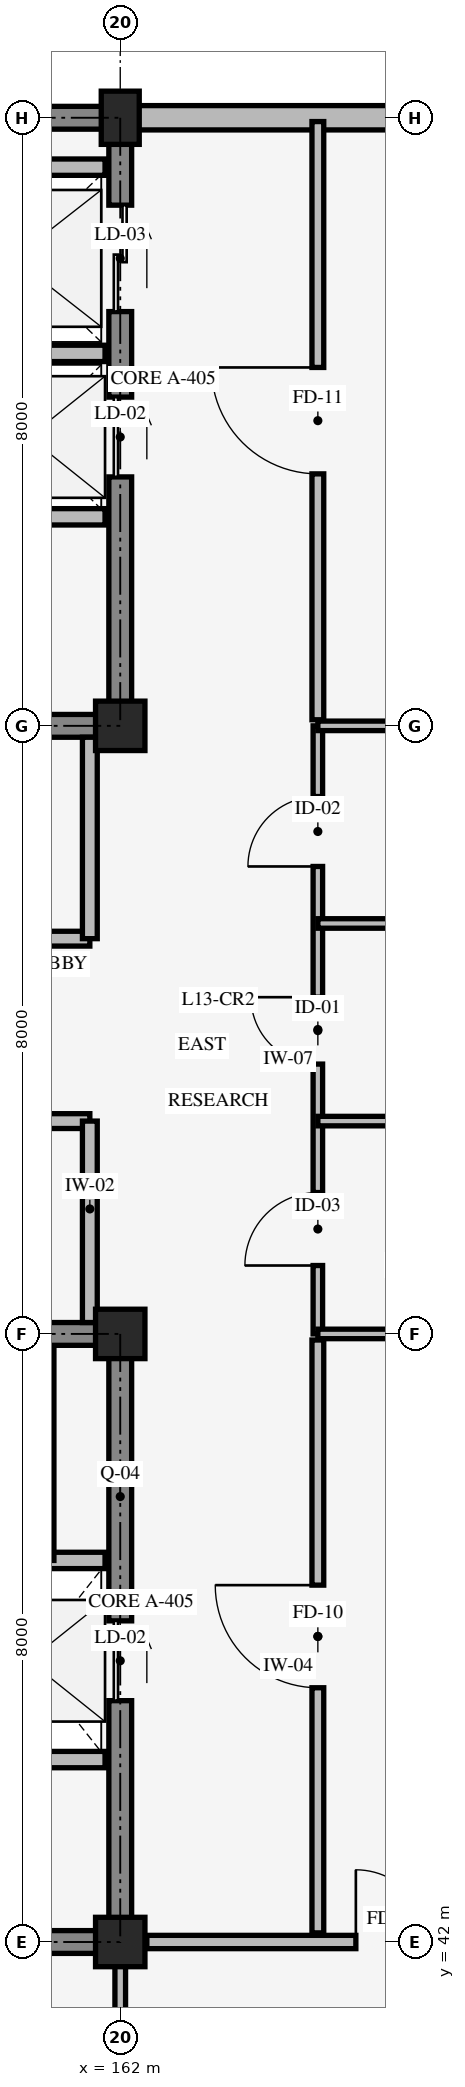
"""IFC4 building model, lengths in metres.
Left out: names, types, materials, properties, quantities, classifications, styles, units other than length and angle.
Written with IfcOpenShell. Run it as: python <this file> out.ifc"""

import sys

from ifc_helpers import new_model, si_unit, direction, frame, frame_2d, origin, origin_2d, place, context, subcontext, project, spatial, rectangle, extrude, element, fill, save


model = new_model("IFC4")
c1 = context("Model", 3, precision=1e-05, world=origin(), true_north=direction((0.0, 1.0)))
c2 = subcontext(c1, "Body", "Model", "MODEL_VIEW")
j1 = project(units=[si_unit("LENGTHUNIT", "METRE"), si_unit("PLANEANGLEUNIT", "RADIAN")], contexts=[c1])
p1 = place(None, origin())
s1 = spatial("IfcSite", under=j1, at=p1, CompositionType="ELEMENT")
p2 = place(p1, origin())
s2 = spatial("IfcBuilding", under=s1, at=p2, CompositionType="ELEMENT")
p3 = place(p2, frame((0.0, 0.0, 52.8)))
s3 = spatial("IfcBuildingStorey", under=s2, at=p3, CompositionType="ELEMENT", Elevation=52.8)
p4 = place(p3, frame((154.0, 42.0, 0.0), z_axis=(0.0, 0.0, 1.0), x_axis=(1.0, 0.0, 0.0)))
e1 = element("IfcWall", 1, at=p4, inside=s3, PredefinedType="SHEAR", context=c2, shape_type="SweptSolid", body=[
    extrude(rectangle(XDim=8.0, YDim=0.3, at=frame_2d((4.0, 0.0))), origin(), (0.0, 0.0, 1.0), 3.95),
])
p5 = place(p3, frame((162.0, 42.0, 0.0), z_axis=(0.0, 0.0, 1.0), x_axis=(0.0, 1.0, 0.0)))
e2 = element("IfcWall", 2, at=p5, inside=s3, PredefinedType="SHEAR", context=c2, shape_type="SweptSolid", body=[
    extrude(rectangle(XDim=8.0, YDim=0.3, at=frame_2d((4.0, 0.0))), origin(), (0.0, 0.0, 1.0), 3.95),
])
p6 = place(p5, frame((3.175, 0.0, 0.0)))
e3 = element("IfcOpeningElement", 3, at=p6, cuts=e2, PredefinedType="OPENING", context=c2, shape_type="SweptSolid", body=[
    extrude(rectangle(XDim=1.05, YDim=2.2, at=frame_2d((0.525, 1.1))), frame((0.0, 0.16, 0.0), z_axis=(0.0, -1.0, 0.0), x_axis=(1.0, 0.0, 0.0)), (0.0, 0.0, 1.0), 0.32),
])
p7 = place(p3, frame((162.0, 50.0, 0.0), z_axis=(0.0, 0.0, 1.0), x_axis=(-1.0, 0.0, 0.0)))
e4 = element("IfcWall", 4, at=p7, inside=s3, PredefinedType="SHEAR", context=c2, shape_type="SweptSolid", body=[
    extrude(rectangle(XDim=8.0, YDim=0.3, at=frame_2d((4.0, 0.0))), origin(), (0.0, 0.0, 1.0), 3.95),
])
p8 = place(p7, frame((5.3, 0.0, 0.0)))
e5 = element("IfcOpeningElement", 5, at=p8, cuts=e4, PredefinedType="OPENING", context=c2, shape_type="SweptSolid", body=[
    extrude(rectangle(XDim=1.3, YDim=2.15, at=frame_2d((0.65, 1.075))), frame((0.0, 0.16, 0.0), z_axis=(0.0, -1.0, 0.0), x_axis=(1.0, 0.0, 0.0)), (0.0, 0.0, 1.0), 0.32),
])
p9 = place(p7, frame((1.45, 0.0, 0.0)))
e6 = element("IfcOpeningElement", 6, at=p9, cuts=e4, PredefinedType="OPENING", context=c2, shape_type="SweptSolid", body=[
    extrude(rectangle(XDim=1.1, YDim=2.2, at=frame_2d((0.55, 1.1))), frame((0.0, 0.16, 0.0), z_axis=(0.0, -1.0, 0.0), x_axis=(1.0, 0.0, 0.0)), (0.0, 0.0, 1.0), 0.32),
])
p10 = place(p3, frame((154.0, 58.0, 0.0), z_axis=(0.0, 0.0, 1.0), x_axis=(1.0, 0.0, 0.0)))
e7 = element("IfcWall", 7, at=p10, inside=s3, PredefinedType="SHEAR", context=c2, shape_type="SweptSolid", body=[
    extrude(rectangle(XDim=8.0, YDim=0.3, at=frame_2d((4.0, 0.0))), origin(), (0.0, 0.0, 1.0), 3.95),
])
p11 = place(p10, frame((1.4, 0.0, 0.0)))
e8 = element("IfcOpeningElement", 8, at=p11, cuts=e7, PredefinedType="OPENING", context=c2, shape_type="SweptSolid", body=[
    extrude(rectangle(XDim=1.3, YDim=2.15, at=frame_2d((0.65, 1.075))), frame((0.0, 0.16, 0.0), z_axis=(0.0, -1.0, 0.0), x_axis=(1.0, 0.0, 0.0)), (0.0, 0.0, 1.0), 0.32),
])
p12 = place(p10, frame((5.3, 0.0, 0.0)))
e9 = element("IfcOpeningElement", 9, at=p12, cuts=e7, PredefinedType="OPENING", context=c2, shape_type="SweptSolid", body=[
    extrude(rectangle(XDim=1.1, YDim=2.2, at=frame_2d((0.55, 1.1))), frame((0.0, 0.16, 0.0), z_axis=(0.0, -1.0, 0.0), x_axis=(1.0, 0.0, 0.0)), (0.0, 0.0, 1.0), 0.32),
])
p13 = place(p3, frame((162.0, 58.0, 0.0), z_axis=(0.0, 0.0, 1.0), x_axis=(0.0, 1.0, 0.0)))
e10 = element("IfcWall", 10, at=p13, inside=s3, PredefinedType="SHEAR", context=c2, shape_type="SweptSolid", body=[
    extrude(rectangle(XDim=8.0, YDim=0.3, at=frame_2d((4.0, 0.0))), origin(), (0.0, 0.0, 1.0), 3.95),
])
p14 = place(p13, frame((3.275, 0.0, 0.0)))
e11 = element("IfcOpeningElement", 11, at=p14, cuts=e10, PredefinedType="OPENING", context=c2, shape_type="SweptSolid", body=[
    extrude(rectangle(XDim=1.05, YDim=2.2, at=frame_2d((0.525, 1.1))), frame((0.0, 0.16, 0.0), z_axis=(0.0, -1.0, 0.0), x_axis=(1.0, 0.0, 0.0)), (0.0, 0.0, 1.0), 0.32),
])
p15 = place(p13, frame((5.45, 0.0, 0.0)))
e12 = element("IfcOpeningElement", 12, at=p15, cuts=e10, PredefinedType="OPENING", context=c2, shape_type="SweptSolid", body=[
    extrude(rectangle(XDim=1.4, YDim=2.3, at=frame_2d((0.7, 1.15))), frame((0.0, 0.16, 0.0), z_axis=(0.0, -1.0, 0.0), x_axis=(1.0, 0.0, 0.0)), (0.0, 0.0, 1.0), 0.32),
])
p16 = place(p3, frame((162.0, 66.0, 0.0), z_axis=(0.0, 0.0, 1.0), x_axis=(-1.0, 0.0, 0.0)))
e13 = element("IfcWall", 13, at=p16, inside=s3, PredefinedType="SHEAR", context=c2, shape_type="SweptSolid", body=[
    extrude(rectangle(XDim=8.0, YDim=0.3, at=frame_2d((4.0, 0.0))), origin(), (0.0, 0.0, 1.0), 3.95),
])
for number, where, z_axis, x_axis in (
    (14, (162.0, 42.0, 0.0), (0.0, 0.0, 1.0), (1.0, 0.0, 0.0)),
    (15, (162.0, 50.0, 0.0), (0.0, 0.0, 1.0), (1.0, 0.0, 0.0)),
    (16, (162.0, 58.0, 0.0), (0.0, 0.0, 1.0), (1.0, 0.0, 0.0)),
):
    element("IfcColumn", number, at=place(p3, frame(where, z_axis=z_axis, x_axis=x_axis)), inside=s3, PredefinedType="COLUMN", context=c2, shape_type="SweptSolid", body=[
        extrude(rectangle(XDim=0.65, YDim=0.65, at=origin_2d()), origin(), (0.0, 0.0, 1.0), 4.2),
    ])
p17 = place(p3, frame((162.0, 66.0, 0.0), z_axis=(0.0, 0.0, 1.0), x_axis=(1.0, 0.0, 0.0)))
e17 = element("IfcColumn", 17, at=p17, inside=s3, PredefinedType="COLUMN", context=c2, shape_type="SweptSolid", body=[
    extrude(rectangle(XDim=0.5, YDim=0.7, at=origin_2d()), origin(), (0.0, 0.0, 1.0), 4.2),
])
p18 = place(p3, frame((162.0, 66.0, 0.0), z_axis=(0.0, 0.0, 1.0), x_axis=(1.0, 0.0, 0.0)))
e18 = element("IfcWall", 18, at=p18, inside=s3, PredefinedType="STANDARD", context=c2, shape_type="SweptSolid", body=[
    extrude(rectangle(XDim=8.0, YDim=0.32, at=frame_2d((4.0, 0.0))), origin(), (0.0, 0.0, 1.0), 3.29),
])
p19 = place(p18, frame((4.317, 0.0, 0.85)))
e19 = element("IfcOpeningElement", 19, at=p19, cuts=e18, PredefinedType="OPENING", context=c2, shape_type="SweptSolid", body=[
    extrude(rectangle(XDim=2.3, YDim=1.5, at=frame_2d((1.15, 0.75))), frame((0.0, 0.17, 0.0), z_axis=(0.0, -1.0, 0.0), x_axis=(1.0, 0.0, 0.0)), (0.0, 0.0, 1.0), 0.34),
])
p20 = place(p3, frame((158.45, 47.02, 0.0), z_axis=(0.0, 0.0, 1.0), x_axis=(1.0, 0.0, 0.0)))
e20 = element("IfcWall", 20, at=p20, inside=s3, PredefinedType="STANDARD", context=c2, shape_type="SweptSolid", body=[
    extrude(rectangle(XDim=3.35, YDim=0.215, at=frame_2d((1.675, 0.0))), origin(), (0.0, 0.0, 1.0), 3.9),
])
p21 = place(p3, frame((161.02, 47.02, 0.0), z_axis=(0.0, 0.0, 1.0), x_axis=(0.0, 1.0, 0.0)))
e21 = element("IfcWall", 21, at=p21, inside=s3, PredefinedType="STANDARD", context=c2, shape_type="SweptSolid", body=[
    extrude(rectangle(XDim=2.78, YDim=0.215, at=frame_2d((1.39, 0.0))), origin(), (0.0, 0.0, 1.0), 3.9),
])
p22 = place(p3, frame((159.78, 44.4, 0.0), z_axis=(0.0, 0.0, 1.0), x_axis=(1.0, 0.0, 0.0)))
e22 = element("IfcWall", 22, at=p22, inside=s3, PredefinedType="STANDARD", context=c2, shape_type="SweptSolid", body=[
    extrude(rectangle(XDim=2.02, YDim=0.215, at=frame_2d((1.01, 0.0))), origin(), (0.0, 0.0, 1.0), 3.9),
])
p23 = place(p3, frame((158.45, 62.9, 0.0), z_axis=(0.0, 0.0, 1.0), x_axis=(1.0, 0.0, 0.0)))
e23 = element("IfcWall", 23, at=p23, inside=s3, PredefinedType="STANDARD", context=c2, shape_type="SweptSolid", body=[
    extrude(rectangle(XDim=3.35, YDim=0.215, at=frame_2d((1.675, 0.0))), origin(), (0.0, 0.0, 1.0), 3.9),
])
p24 = place(p3, frame((159.38, 65.35, 0.0), z_axis=(0.0, 0.0, 1.0), x_axis=(1.0, 0.0, 0.0)))
e24 = element("IfcWall", 24, at=p24, inside=s3, PredefinedType="STANDARD", context=c2, shape_type="SweptSolid", body=[
    extrude(rectangle(XDim=2.42, YDim=0.215, at=frame_2d((1.21, 0.0))), origin(), (0.0, 0.0, 1.0), 3.9),
])
p25 = place(p3, frame((158.45, 60.75, 0.0), z_axis=(0.0, 0.0, 1.0), x_axis=(1.0, 0.0, 0.0)))
e25 = element("IfcWall", 25, at=p25, inside=s3, PredefinedType="STANDARD", context=c2, shape_type="SweptSolid", body=[
    extrude(rectangle(XDim=3.35, YDim=0.215, at=frame_2d((1.675, 0.0))), origin(), (0.0, 0.0, 1.0), 3.9),
])
p26 = place(p3, frame((154.0, 52.8, 0.0), z_axis=(0.0, 0.0, 1.0), x_axis=(1.0, 0.0, 0.0)))
e26 = element("IfcWall", 26, at=p26, inside=s3, PredefinedType="STANDARD", context=c2, shape_type="SweptSolid", body=[
    extrude(rectangle(XDim=7.6, YDim=0.195, at=frame_2d((3.8, 0.0))), origin(), (0.0, 0.0, 1.0), 3.9),
])
p27 = place(p26, frame((2.8, 0.0, 0.0)))
e27 = element("IfcOpeningElement", 27, at=p27, cuts=e26, PredefinedType="OPENING", context=c2, shape_type="SweptSolid", body=[
    extrude(rectangle(XDim=1.25, YDim=2.15, at=frame_2d((0.625, 1.075))), frame((0.0, 0.107, 0.0), z_axis=(0.0, -1.0, 0.0), x_axis=(1.0, 0.0, 0.0)), (0.0, 0.0, 1.0), 0.215),
])
p28 = place(p3, frame((161.6, 50.15, 0.0), z_axis=(0.0, 0.0, 1.0), x_axis=(0.0, 1.0, 0.0)))
e28 = element("IfcWall", 28, at=p28, inside=s3, PredefinedType="STANDARD", context=c2, shape_type="SweptSolid", body=[
    extrude(rectangle(XDim=2.65, YDim=0.195, at=frame_2d((1.325, 0.0))), origin(), (0.0, 0.0, 1.0), 3.34),
])
p29 = place(p3, frame((154.0, 55.2, 0.0), z_axis=(0.0, 0.0, 1.0), x_axis=(1.0, 0.0, 0.0)))
e29 = element("IfcWall", 29, at=p29, inside=s3, PredefinedType="STANDARD", context=c2, shape_type="SweptSolid", body=[
    extrude(rectangle(XDim=7.6, YDim=0.195, at=frame_2d((3.8, 0.0))), origin(), (0.0, 0.0, 1.0), 3.9),
])
p30 = place(p29, frame((2.8, 0.0, 0.0)))
e30 = element("IfcOpeningElement", 30, at=p30, cuts=e29, PredefinedType="OPENING", context=c2, shape_type="SweptSolid", body=[
    extrude(rectangle(XDim=1.35, YDim=2.15, at=frame_2d((0.675, 1.075))), frame((0.0, 0.107, 0.0), z_axis=(0.0, -1.0, 0.0), x_axis=(1.0, 0.0, 0.0)), (0.0, 0.0, 1.0), 0.215),
])
p31 = place(p3, frame((161.6, 55.2, 0.0), z_axis=(0.0, 0.0, 1.0), x_axis=(0.0, 1.0, 0.0)))
e31 = element("IfcWall", 31, at=p31, inside=s3, PredefinedType="STANDARD", context=c2, shape_type="SweptSolid", body=[
    extrude(rectangle(XDim=2.65, YDim=0.195, at=frame_2d((1.325, 0.0))), origin(), (0.0, 0.0, 1.0), 3.34),
])
p32 = place(p3, frame((164.6, 50.0, 0.0), z_axis=(0.0, 0.0, 1.0), x_axis=(0.0, 1.0, 0.0)))
e32 = element("IfcWall", 32, at=p32, inside=s3, PredefinedType="STANDARD", context=c2, shape_type="SweptSolid", body=[
    extrude(rectangle(XDim=8.0, YDim=0.125, at=frame_2d((4.0, 0.0))), origin(), (0.0, 0.0, 1.0), 3.9),
])
p33 = place(p32, frame((0.9, 0.0, 0.0)))
e33 = element("IfcOpeningElement", 33, at=p33, cuts=e32, PredefinedType="OPENING", context=c2, shape_type="SweptSolid", body=[
    extrude(rectangle(XDim=0.96, YDim=2.08, at=frame_2d((0.48, 1.04))), frame((0.0, 0.073, 0.0), z_axis=(0.0, -1.0, 0.0), x_axis=(1.0, 0.0, 0.0)), (0.0, 0.0, 1.0), 0.145),
])
p34 = place(p32, frame((3.55, 0.0, 0.0)))
e34 = element("IfcOpeningElement", 34, at=p34, cuts=e32, PredefinedType="OPENING", context=c2, shape_type="SweptSolid", body=[
    extrude(rectangle(XDim=0.88, YDim=2.05, at=frame_2d((0.44, 1.025))), frame((0.0, 0.073, 0.0), z_axis=(0.0, -1.0, 0.0), x_axis=(1.0, 0.0, 0.0)), (0.0, 0.0, 1.0), 0.145),
])
p35 = place(p32, frame((6.15, 0.0, 0.0)))
e35 = element("IfcOpeningElement", 35, at=p35, cuts=e32, PredefinedType="OPENING", context=c2, shape_type="SweptSolid", body=[
    extrude(rectangle(XDim=0.92, YDim=2.05, at=frame_2d((0.46, 1.025))), frame((0.0, 0.073, 0.0), z_axis=(0.0, -1.0, 0.0), x_axis=(1.0, 0.0, 0.0)), (0.0, 0.0, 1.0), 0.145),
])
p36 = place(p3, frame((164.6, 50.0, 0.0), z_axis=(0.0, 0.0, 1.0), x_axis=(1.0, 0.0, 0.0)))
e36 = element("IfcWall", 36, at=p36, inside=s3, PredefinedType="STANDARD", context=c2, shape_type="SweptSolid", body=[
    extrude(rectangle(XDim=3.8, YDim=0.125, at=frame_2d((1.9, 0.0))), origin(), (0.0, 0.0, 1.0), 3.29),
])
for number, where, z_axis, x_axis in (
    (37, (164.6, 52.8, 0.0), (0.0, 0.0, 1.0), (1.0, 0.0, 0.0)),
    (38, (164.6, 55.4, 0.0), (0.0, 0.0, 1.0), (1.0, 0.0, 0.0)),
):
    element("IfcWall", number, at=place(p3, frame(where, z_axis=z_axis, x_axis=x_axis)), inside=s3, PredefinedType="STANDARD", context=c2, shape_type="SweptSolid", body=[
        extrude(rectangle(XDim=3.8, YDim=0.125, at=frame_2d((1.9, 0.0))), origin(), (0.0, 0.0, 1.0), 3.9),
    ])
p37 = place(p3, frame((164.6, 58.0, 0.0), z_axis=(0.0, 0.0, 1.0), x_axis=(1.0, 0.0, 0.0)))
e39 = element("IfcWall", 39, at=p37, inside=s3, PredefinedType="STANDARD", context=c2, shape_type="SweptSolid", body=[
    extrude(rectangle(XDim=3.8, YDim=0.125, at=frame_2d((1.9, 0.0))), origin(), (0.0, 0.0, 1.0), 3.29),
])
p38 = place(p3, frame((164.6, 42.12, 0.0), z_axis=(0.0, 0.0, 1.0), x_axis=(0.0, 1.0, 0.0)))
e40 = element("IfcWall", 40, at=p38, inside=s3, PredefinedType="STANDARD", context=c2, shape_type="SweptSolid", body=[
    extrude(rectangle(XDim=7.8, YDim=0.155, at=frame_2d((3.9, 0.0))), origin(), (0.0, 0.0, 1.0), 3.9),
])
p39 = place(p38, frame((3.225, 0.0, 0.0)))
e41 = element("IfcOpeningElement", 41, at=p39, cuts=e40, PredefinedType="OPENING", context=c2, shape_type="SweptSolid", body=[
    extrude(rectangle(XDim=1.35, YDim=2.15, at=frame_2d((0.675, 1.075))), frame((0.0, 0.087, 0.0), z_axis=(0.0, -1.0, 0.0), x_axis=(1.0, 0.0, 0.0)), (0.0, 0.0, 1.0), 0.175),
])
p40 = place(p3, frame((164.6, 58.08, 0.0), z_axis=(0.0, 0.0, 1.0), x_axis=(0.0, 1.0, 0.0)))
e42 = element("IfcWall", 42, at=p40, inside=s3, PredefinedType="STANDARD", context=c2, shape_type="SweptSolid", body=[
    extrude(rectangle(XDim=7.87, YDim=0.155, at=frame_2d((3.935, 0.0))), origin(), (0.0, 0.0, 1.0), 3.9),
])
p41 = place(p40, frame((3.235, 0.0, 0.0)))
e43 = element("IfcOpeningElement", 43, at=p41, cuts=e42, PredefinedType="OPENING", context=c2, shape_type="SweptSolid", body=[
    extrude(rectangle(XDim=1.4, YDim=2.2, at=frame_2d((0.7, 1.1))), frame((0.0, 0.087, 0.0), z_axis=(0.0, -1.0, 0.0), x_axis=(1.0, 0.0, 0.0)), (0.0, 0.0, 1.0), 0.175),
])
p42 = place(p3, frame((162.0, 34.05, 0.0), z_axis=(0.0, 0.0, 1.0), x_axis=(0.0, 1.0, 0.0)))
e44 = element("IfcWall", 44, at=p42, inside=s3, PredefinedType="STANDARD", context=c2, shape_type="SweptSolid", body=[
    extrude(rectangle(XDim=7.83, YDim=0.14, at=frame_2d((3.915, 0.0))), origin(), (0.0, 0.0, 1.0), 3.9),
])
p43 = place(p42, frame((3.0, 0.0, 0.0)))
e45 = element("IfcOpeningElement", 45, at=p43, cuts=e44, PredefinedType="OPENING", context=c2, shape_type="SweptSolid", body=[
    extrude(rectangle(XDim=1.06, YDim=2.12, at=frame_2d((0.53, 1.06))), frame((0.0, 0.08, 0.0), z_axis=(0.0, -1.0, 0.0), x_axis=(1.0, 0.0, 0.0)), (0.0, 0.0, 1.0), 0.16),
])
p44 = place(p3, frame((162.35, 42.0, 0.0), z_axis=(0.0, 0.0, 1.0), x_axis=(1.0, 0.0, 0.0)))
e46 = element("IfcWall", 46, at=p44, inside=s3, PredefinedType="STANDARD", context=c2, shape_type="SweptSolid", body=[
    extrude(rectangle(XDim=14.7, YDim=0.175, at=frame_2d((7.35, 0.0))), origin(), (0.0, 0.0, 1.0), 3.29),
])
p45 = place(p44, frame((2.75, 0.0, 0.0)))
e47 = element("IfcOpeningElement", 47, at=p45, cuts=e46, PredefinedType="OPENING", context=c2, shape_type="SweptSolid", body=[
    extrude(rectangle(XDim=0.95, YDim=2.1, at=frame_2d((0.475, 1.05))), frame((0.0, 0.098, 0.0), z_axis=(0.0, -1.0, 0.0), x_axis=(1.0, 0.0, 0.0)), (0.0, 0.0, 1.0), 0.195),
])
p46 = place(p6, origin())
e48 = element("IfcDoor", 48, at=p46, inside=s3, OperationType="SLIDING_TO_LEFT", PredefinedType="DOOR", context=c2, shape_type="SweptSolid", body=[
    extrude(rectangle(XDim=1.05, YDim=2.2, at=frame_2d((0.525, 1.1))), frame((0.0, 0.025, 0.0), z_axis=(0.0, -1.0, 0.0), x_axis=(1.0, 0.0, 0.0)), (0.0, 0.0, 1.0), 0.05),
])
fill(e3, e48)
p47 = place(p14, origin())
e49 = element("IfcDoor", 49, at=p47, inside=s3, OperationType="SLIDING_TO_RIGHT", PredefinedType="DOOR", context=c2, shape_type="SweptSolid", body=[
    extrude(rectangle(XDim=1.05, YDim=2.2, at=frame_2d((0.525, 1.1))), frame((0.0, 0.025, 0.0), z_axis=(0.0, -1.0, 0.0), x_axis=(1.0, 0.0, 0.0)), (0.0, 0.0, 1.0), 0.05),
])
fill(e11, e49)
p48 = place(p15, origin())
e50 = element("IfcDoor", 50, at=p48, inside=s3, OperationType="DOUBLE_DOOR_SLIDING", PredefinedType="DOOR", context=c2, shape_type="SweptSolid", body=[
    extrude(rectangle(XDim=1.4, YDim=2.3, at=frame_2d((0.7, 1.15))), frame((0.0, 0.025, 0.0), z_axis=(0.0, -1.0, 0.0), x_axis=(1.0, 0.0, 0.0)), (0.0, 0.0, 1.0), 0.05),
])
fill(e12, e50)
p49 = place(p33, origin())
e51 = element("IfcDoor", 51, at=p49, inside=s3, OperationType="SINGLE_SWING_LEFT", PredefinedType="DOOR", context=c2, shape_type="SweptSolid", body=[
    extrude(rectangle(XDim=0.96, YDim=2.08, at=frame_2d((0.48, 1.04))), frame((0.0, 0.025, 0.0), z_axis=(0.0, -1.0, 0.0), x_axis=(1.0, 0.0, 0.0)), (0.0, 0.0, 1.0), 0.05),
])
fill(e33, e51)
p50 = place(p34, origin())
e52 = element("IfcDoor", 52, at=p50, inside=s3, OperationType="SINGLE_SWING_RIGHT", PredefinedType="DOOR", context=c2, shape_type="SweptSolid", body=[
    extrude(rectangle(XDim=0.88, YDim=2.05, at=frame_2d((0.44, 1.025))), frame((0.0, 0.025, 0.0), z_axis=(0.0, -1.0, 0.0), x_axis=(1.0, 0.0, 0.0)), (0.0, 0.0, 1.0), 0.05),
])
fill(e34, e52)
p51 = place(p35, origin())
e53 = element("IfcDoor", 53, at=p51, inside=s3, OperationType="SINGLE_SWING_LEFT", PredefinedType="DOOR", context=c2, shape_type="SweptSolid", body=[
    extrude(rectangle(XDim=0.92, YDim=2.05, at=frame_2d((0.46, 1.025))), frame((0.0, 0.025, 0.0), z_axis=(0.0, -1.0, 0.0), x_axis=(1.0, 0.0, 0.0)), (0.0, 0.0, 1.0), 0.05),
])
fill(e35, e53)
p52 = place(p39, origin())
e54 = element("IfcDoor", 54, at=p52, inside=s3, OperationType="SINGLE_SWING_RIGHT", PredefinedType="DOOR", context=c2, shape_type="SweptSolid", body=[
    extrude(rectangle(XDim=1.35, YDim=2.15, at=frame_2d((0.675, 1.075))), frame((0.0, 0.025, 0.0), z_axis=(0.0, -1.0, 0.0), x_axis=(1.0, 0.0, 0.0)), (0.0, 0.0, 1.0), 0.05),
])
fill(e41, e54)
p53 = place(p41, origin())
e55 = element("IfcDoor", 55, at=p53, inside=s3, OperationType="SINGLE_SWING_RIGHT", PredefinedType="DOOR", context=c2, shape_type="SweptSolid", body=[
    extrude(rectangle(XDim=1.4, YDim=2.2, at=frame_2d((0.7, 1.1))), frame((0.0, 0.025, 0.0), z_axis=(0.0, -1.0, 0.0), x_axis=(1.0, 0.0, 0.0)), (0.0, 0.0, 1.0), 0.05),
])
fill(e43, e55)
p54 = place(p45, origin())
e56 = element("IfcDoor", 56, at=p54, inside=s3, OperationType="SINGLE_SWING_LEFT", PredefinedType="DOOR", context=c2, shape_type="SweptSolid", body=[
    extrude(rectangle(XDim=0.95, YDim=2.1, at=frame_2d((0.475, 1.05))), frame((0.0, 0.025, 0.0), z_axis=(0.0, -1.0, 0.0), x_axis=(1.0, 0.0, 0.0)), (0.0, 0.0, 1.0), 0.05),
])
fill(e47, e56)
save(model, sys.argv[1])
